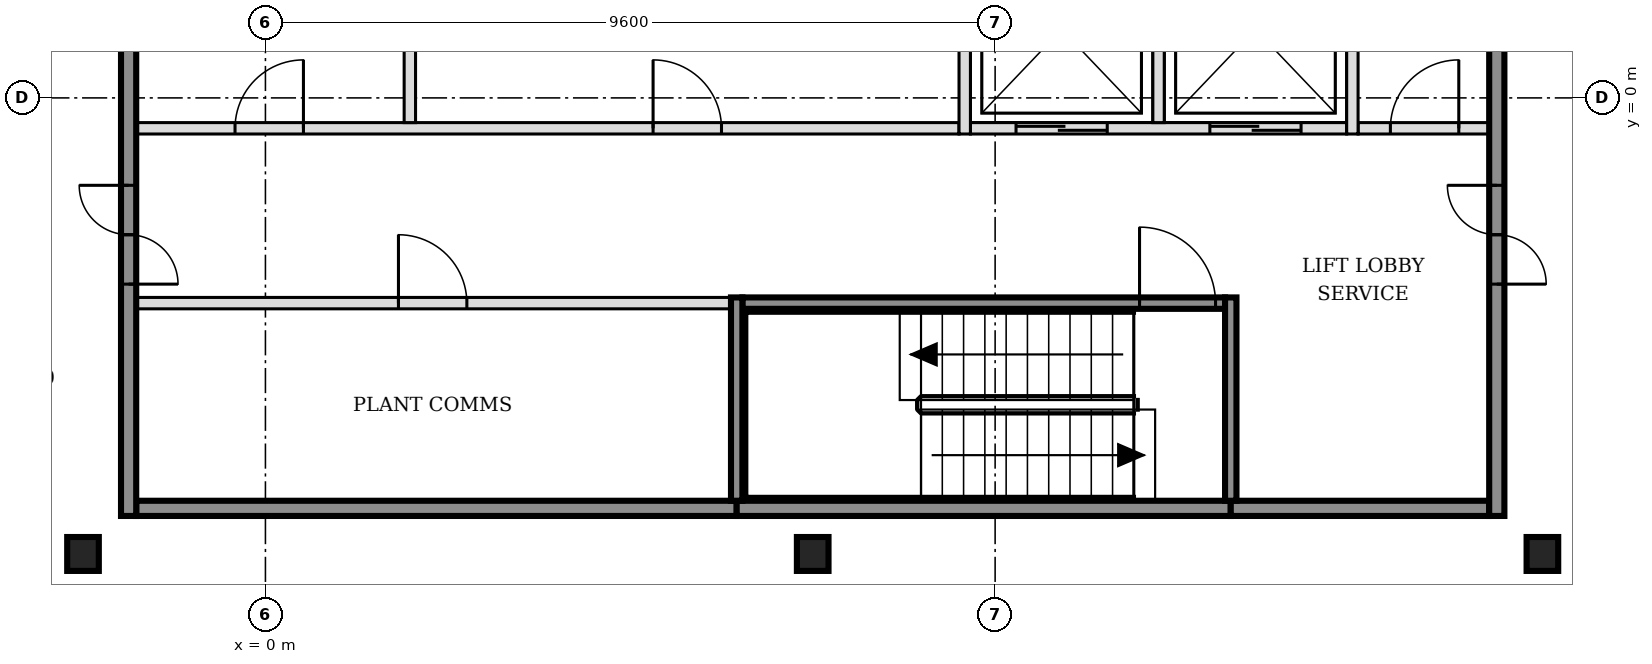
"""IFC4 building model, lengths in metres.
Left out: names, types, materials, properties, quantities, classifications, styles, units other than length and angle.
Written with IfcOpenShell. Run it as: python <this file> out.ifc"""

import sys

from ifc_helpers import new_model, si_unit, direction, frame, frame_2d, origin, origin_2d, place, context, subcontext, project, spatial, rectangle, i_section, extrude, element, fill, save


model = new_model("IFC4")
c1 = context("Model", 3, precision=1e-05, world=origin(), true_north=direction((0.0, 1.0)))
c2 = subcontext(c1, "Body", "Model", "MODEL_VIEW")
j1 = project(units=[si_unit("LENGTHUNIT", "METRE"), si_unit("PLANEANGLEUNIT", "RADIAN")], contexts=[c1])
p1 = place(None, origin())
s1 = spatial("IfcSite", under=j1, at=p1, CompositionType="ELEMENT")
p2 = place(p1, origin())
s2 = spatial("IfcBuilding", under=s1, at=p2, CompositionType="ELEMENT")
p3 = place(p2, frame((0.0, 0.0, 183.0)))
s3 = spatial("IfcBuildingStorey", under=s2, at=p3, CompositionType="ELEMENT", Elevation=183.0)
for number, where, z_axis, x_axis in (
    (1, (-2.4, -6.0, -0.15), (0.0, 0.0, 1.0), (1.0, 0.0, 0.0)),
    (2, (7.2, -6.0, -0.15), (0.0, 0.0, 1.0), (1.0, 0.0, 0.0)),
    (3, (16.8, -6.0, -0.15), (0.0, 0.0, 1.0), (1.0, 0.0, 0.0)),
):
    element("IfcColumn", number, at=place(p3, frame(where, z_axis=z_axis, x_axis=x_axis)), inside=s3, PredefinedType="COLUMN", context=c2, shape_type="SweptSolid", body=[
        extrude(i_section(OverallWidth=0.416, OverallDepth=0.446, WebThickness=0.039, FlangeThickness=0.063, FilletRadius=0.015, at=origin_2d()), origin(), (0.0, 0.0, 1.0), 3.6),
    ])
p4 = place(p3, frame((-1.7, -5.4, 0.0), z_axis=(0.0, 0.0, 1.0), x_axis=(1.0, 0.0, 0.0)))
e4 = element("IfcWall", 4, at=p4, inside=s3, PredefinedType="SOLIDWALL", context=c2, shape_type="SweptSolid", body=[
    extrude(rectangle(XDim=7.9, YDim=0.2, at=frame_2d((3.95, 0.0))), origin(), (0.0, 0.0, 1.0), 3.45),
])
p5 = place(p3, frame((6.2, -5.4, 0.0), z_axis=(0.0, 0.0, 1.0), x_axis=(1.0, 0.0, 0.0)))
e5 = element("IfcWall", 5, at=p5, inside=s3, PredefinedType="SOLIDWALL", context=c2, shape_type="SweptSolid", body=[
    extrude(rectangle(XDim=6.5, YDim=0.2, at=frame_2d((3.25, 0.0))), origin(), (0.0, 0.0, 1.0), 3.45),
])
p6 = place(p3, frame((12.7, -5.4, 0.0), z_axis=(0.0, 0.0, 1.0), x_axis=(1.0, 0.0, 0.0)))
e6 = element("IfcWall", 6, at=p6, inside=s3, PredefinedType="SOLIDWALL", context=c2, shape_type="SweptSolid", body=[
    extrude(rectangle(XDim=3.4, YDim=0.2, at=frame_2d((1.7, 0.0))), origin(), (0.0, 0.0, 1.0), 3.45),
])
p7 = place(p3, frame((-1.7, -2.7, 0.0), z_axis=(0.0, 0.0, 1.0), x_axis=(1.0, 0.0, 0.0)))
e7 = element("IfcWall", 7, at=p7, inside=s3, PredefinedType="PARTITIONING", context=c2, shape_type="SweptSolid", body=[
    extrude(rectangle(XDim=7.825, YDim=0.15, at=frame_2d((3.913, 0.0))), origin(), (0.0, 0.0, 1.0), 3.45),
])
p8 = place(p7, frame((3.45, 0.0, 0.0)))
e8 = element("IfcOpeningElement", 8, at=p8, cuts=e7, PredefinedType="OPENING", context=c2, shape_type="SweptSolid", body=[
    extrude(rectangle(XDim=0.9, YDim=2.1, at=frame_2d((0.45, 1.05))), frame((0.0, 0.085, 0.0), z_axis=(0.0, -1.0, 0.0), x_axis=(1.0, 0.0, 0.0)), (0.0, 0.0, 1.0), 0.17),
])
p9 = place(p3, frame((6.275, -2.7, 0.0), z_axis=(0.0, 0.0, 1.0), x_axis=(1.0, 0.0, 0.0)))
e9 = element("IfcWall", 9, at=p9, inside=s3, PredefinedType="SOLIDWALL", context=c2, shape_type="SweptSolid", body=[
    extrude(rectangle(XDim=6.35, YDim=0.15, at=frame_2d((3.175, 0.0))), origin(), (0.0, 0.0, 1.0), 3.45),
])
p10 = place(p9, frame((5.225, 0.0, 0.0)))
e10 = element("IfcOpeningElement", 10, at=p10, cuts=e9, PredefinedType="OPENING", context=c2, shape_type="SweptSolid", body=[
    extrude(rectangle(XDim=1.0, YDim=2.1, at=frame_2d((0.5, 1.05))), frame((0.0, 0.085, 0.0), z_axis=(0.0, -1.0, 0.0), x_axis=(1.0, 0.0, 0.0)), (0.0, 0.0, 1.0), 0.17),
])
p11 = place(p3, frame((-1.7, -0.4, 0.0), z_axis=(0.0, 0.0, 1.0), x_axis=(1.0, 0.0, 0.0)))
e11 = element("IfcWall", 11, at=p11, inside=s3, PredefinedType="PARTITIONING", context=c2, shape_type="SweptSolid", body=[
    extrude(rectangle(XDim=10.825, YDim=0.15, at=frame_2d((5.413, 0.0))), origin(), (0.0, 0.0, 1.0), 3.45),
])
p12 = place(p11, frame((1.3, 0.0, 0.0)))
e12 = element("IfcOpeningElement", 12, at=p12, cuts=e11, PredefinedType="OPENING", context=c2, shape_type="SweptSolid", body=[
    extrude(rectangle(XDim=0.9, YDim=2.1, at=frame_2d((0.45, 1.05))), frame((0.0, 0.085, 0.0), z_axis=(0.0, -1.0, 0.0), x_axis=(1.0, 0.0, 0.0)), (0.0, 0.0, 1.0), 0.17),
])
p13 = place(p11, frame((6.8, 0.0, 0.0)))
e13 = element("IfcOpeningElement", 13, at=p13, cuts=e11, PredefinedType="OPENING", context=c2, shape_type="SweptSolid", body=[
    extrude(rectangle(XDim=0.9, YDim=2.1, at=frame_2d((0.45, 1.05))), frame((0.0, 0.085, 0.0), z_axis=(0.0, -1.0, 0.0), x_axis=(1.0, 0.0, 0.0)), (0.0, 0.0, 1.0), 0.17),
])
p14 = place(p3, frame((9.275, -0.4, 0.0), z_axis=(0.0, 0.0, 1.0), x_axis=(1.0, 0.0, 0.0)))
e14 = element("IfcWall", 14, at=p14, inside=s3, PredefinedType="SOLIDWALL", context=c2, shape_type="SweptSolid", body=[
    extrude(rectangle(XDim=4.95, YDim=0.15, at=frame_2d((2.475, 0.0))), origin(), (0.0, 0.0, 1.0), 3.45),
])
p15 = place(p14, frame((0.6, 0.0, 0.0)))
e15 = element("IfcOpeningElement", 15, at=p15, cuts=e14, PredefinedType="OPENING", context=c2, shape_type="SweptSolid", body=[
    extrude(rectangle(XDim=1.2, YDim=2.1, at=frame_2d((0.6, 1.05))), frame((0.0, 0.085, 0.0), z_axis=(0.0, -1.0, 0.0), x_axis=(1.0, 0.0, 0.0)), (0.0, 0.0, 1.0), 0.17),
])
p16 = place(p14, frame((3.15, 0.0, 0.0)))
e16 = element("IfcOpeningElement", 16, at=p16, cuts=e14, PredefinedType="OPENING", context=c2, shape_type="SweptSolid", body=[
    extrude(rectangle(XDim=1.2, YDim=2.1, at=frame_2d((0.6, 1.05))), frame((0.0, 0.085, 0.0), z_axis=(0.0, -1.0, 0.0), x_axis=(1.0, 0.0, 0.0)), (0.0, 0.0, 1.0), 0.17),
])
p17 = place(p3, frame((14.375, -0.4, 0.0), z_axis=(0.0, 0.0, 1.0), x_axis=(1.0, 0.0, 0.0)))
e17 = element("IfcWall", 17, at=p17, inside=s3, PredefinedType="PARTITIONING", context=c2, shape_type="SweptSolid", body=[
    extrude(rectangle(XDim=1.725, YDim=0.15, at=frame_2d((0.863, 0.0))), origin(), (0.0, 0.0, 1.0), 3.45),
])
p18 = place(p17, frame((0.425, 0.0, 0.0)))
e18 = element("IfcOpeningElement", 18, at=p18, cuts=e17, PredefinedType="OPENING", context=c2, shape_type="SweptSolid", body=[
    extrude(rectangle(XDim=0.9, YDim=2.1, at=frame_2d((0.45, 1.05))), frame((0.0, 0.085, 0.0), z_axis=(0.0, -1.0, 0.0), x_axis=(1.0, 0.0, 0.0)), (0.0, 0.0, 1.0), 0.17),
])
p19 = place(p3, frame((-1.8, -5.5, 0.0), z_axis=(0.0, 0.0, 1.0), x_axis=(0.0, 1.0, 0.0)))
e19 = element("IfcWall", 19, at=p19, inside=s3, PredefinedType="SOLIDWALL", context=c2, shape_type="SweptSolid", body=[
    extrude(rectangle(XDim=15.8, YDim=0.2, at=frame_2d((7.9, 0.0))), origin(), (0.0, 0.0, 1.0), 3.45),
])
p20 = place(p19, frame((3.05, 0.0, 0.0)))
e20 = element("IfcOpeningElement", 20, at=p20, cuts=e19, PredefinedType="OPENING", context=c2, shape_type="SweptSolid", body=[
    extrude(rectangle(XDim=1.3, YDim=2.1, at=frame_2d((0.65, 1.05))), frame((0.0, 0.11, 0.0), z_axis=(0.0, -1.0, 0.0), x_axis=(1.0, 0.0, 0.0)), (0.0, 0.0, 1.0), 0.22),
])
p21 = place(p19, frame((11.45, 0.0, 0.0)))
e21 = element("IfcOpeningElement", 21, at=p21, cuts=e19, PredefinedType="OPENING", context=c2, shape_type="SweptSolid", body=[
    extrude(rectangle(XDim=1.3, YDim=2.1, at=frame_2d((0.65, 1.05))), frame((0.0, 0.11, 0.0), z_axis=(0.0, -1.0, 0.0), x_axis=(1.0, 0.0, 0.0)), (0.0, 0.0, 1.0), 0.22),
])
p22 = place(p3, frame((1.9, -0.325, 0.0), z_axis=(0.0, 0.0, 1.0), x_axis=(0.0, 1.0, 0.0)))
e22 = element("IfcWall", 22, at=p22, inside=s3, PredefinedType="PARTITIONING", context=c2, shape_type="SweptSolid", body=[
    extrude(rectangle(XDim=2.45, YDim=0.15, at=frame_2d((1.225, 0.0))), origin(), (0.0, 0.0, 1.0), 3.45),
])
p23 = place(p3, frame((6.2, -5.3, 0.0), z_axis=(0.0, 0.0, 1.0), x_axis=(0.0, 1.0, 0.0)))
e23 = element("IfcWall", 23, at=p23, inside=s3, PredefinedType="SOLIDWALL", context=c2, shape_type="SweptSolid", body=[
    extrude(rectangle(XDim=2.675, YDim=0.15, at=frame_2d((1.337, 0.0))), origin(), (0.0, 0.0, 1.0), 3.45),
])
p24 = place(p3, frame((9.2, -0.475, 0.0), z_axis=(0.0, 0.0, 1.0), x_axis=(0.0, 1.0, 0.0)))
e24 = element("IfcWall", 24, at=p24, inside=s3, PredefinedType="SOLIDWALL", context=c2, shape_type="SweptSolid", body=[
    extrude(rectangle(XDim=2.6, YDim=0.15, at=frame_2d((1.3, 0.0))), origin(), (0.0, 0.0, 1.0), 3.45),
])
p25 = place(p3, frame((11.75, -0.325, 0.0), z_axis=(0.0, 0.0, 1.0), x_axis=(0.0, 1.0, 0.0)))
e25 = element("IfcWall", 25, at=p25, inside=s3, PredefinedType="SOLIDWALL", context=c2, shape_type="SweptSolid", body=[
    extrude(rectangle(XDim=2.45, YDim=0.15, at=frame_2d((1.225, 0.0))), origin(), (0.0, 0.0, 1.0), 3.45),
])
p26 = place(p3, frame((12.7, -5.3, 0.0), z_axis=(0.0, 0.0, 1.0), x_axis=(0.0, 1.0, 0.0)))
e26 = element("IfcWall", 26, at=p26, inside=s3, PredefinedType="SOLIDWALL", context=c2, shape_type="SweptSolid", body=[
    extrude(rectangle(XDim=2.675, YDim=0.15, at=frame_2d((1.337, 0.0))), origin(), (0.0, 0.0, 1.0), 3.45),
])
p27 = place(p3, frame((14.3, -0.475, 0.0), z_axis=(0.0, 0.0, 1.0), x_axis=(0.0, 1.0, 0.0)))
e27 = element("IfcWall", 27, at=p27, inside=s3, PredefinedType="SOLIDWALL", context=c2, shape_type="SweptSolid", body=[
    extrude(rectangle(XDim=2.75, YDim=0.15, at=frame_2d((1.375, 0.0))), origin(), (0.0, 0.0, 1.0), 3.45),
])
p28 = place(p3, frame((16.2, -5.5, 0.0), z_axis=(0.0, 0.0, 1.0), x_axis=(0.0, 1.0, 0.0)))
e28 = element("IfcWall", 28, at=p28, inside=s3, PredefinedType="SOLIDWALL", context=c2, shape_type="SweptSolid", body=[
    extrude(rectangle(XDim=15.8, YDim=0.2, at=frame_2d((7.9, 0.0))), origin(), (0.0, 0.0, 1.0), 3.45),
])
p29 = place(p28, frame((3.05, 0.0, 0.0)))
e29 = element("IfcOpeningElement", 29, at=p29, cuts=e28, PredefinedType="OPENING", context=c2, shape_type="SweptSolid", body=[
    extrude(rectangle(XDim=1.3, YDim=2.1, at=frame_2d((0.65, 1.05))), frame((0.0, 0.11, 0.0), z_axis=(0.0, -1.0, 0.0), x_axis=(1.0, 0.0, 0.0)), (0.0, 0.0, 1.0), 0.22),
])
p30 = place(p28, frame((11.45, 0.0, 0.0)))
e30 = element("IfcOpeningElement", 30, at=p30, cuts=e28, PredefinedType="OPENING", context=c2, shape_type="SweptSolid", body=[
    extrude(rectangle(XDim=1.3, YDim=2.1, at=frame_2d((0.65, 1.05))), frame((0.0, 0.11, 0.0), z_axis=(0.0, -1.0, 0.0), x_axis=(1.0, 0.0, 0.0)), (0.0, 0.0, 1.0), 0.22),
])
p31 = place(p3, frame((-0.972, -15.622, 0.0), z_axis=(0.0, 0.0, 1.0), x_axis=(-0.707106781187, 0.707106781187, 0.0)))
e31 = element("IfcWall", 31, at=p31, inside=s3, PredefinedType="PARTITIONING", context=c2, shape_type="SweptSolid", body=[
    extrude(rectangle(XDim=18.809, YDim=0.15, at=frame_2d((9.405, 0.0))), origin(), (0.0, 0.0, 1.0), 2.83),
])
p32 = place(p31, frame((8.292, 0.0, 0.0)))
e32 = element("IfcOpeningElement", 32, at=p32, cuts=e31, PredefinedType="OPENING", context=c2, shape_type="SweptSolid", body=[
    extrude(rectangle(XDim=0.9, YDim=2.1, at=frame_2d((0.45, 1.05))), frame((0.0, 0.085, 0.0), z_axis=(0.0, -1.0, 0.0), x_axis=(1.0, 0.0, 0.0)), (0.0, 0.0, 1.0), 0.17),
])
p33 = place(p31, frame((2.195, 0.0, 0.0)))
e33 = element("IfcOpeningElement", 33, at=p33, cuts=e31, PredefinedType="OPENING", context=c2, shape_type="SweptSolid", body=[
    extrude(rectangle(XDim=0.9, YDim=2.1, at=frame_2d((0.45, 1.05))), frame((0.0, 0.085, 0.0), z_axis=(0.0, -1.0, 0.0), x_axis=(1.0, 0.0, 0.0)), (0.0, 0.0, 1.0), 0.17),
])
p34 = place(p15, origin())
e34 = element("IfcDoor", 34, at=p34, inside=s3, OperationType="DOUBLE_DOOR_SLIDING", PredefinedType="DOOR", context=c2, shape_type="SweptSolid", body=[
    extrude(rectangle(XDim=1.2, YDim=2.1, at=frame_2d((0.6, 1.05))), frame((0.0, 0.025, 0.0), z_axis=(0.0, -1.0, 0.0), x_axis=(1.0, 0.0, 0.0)), (0.0, 0.0, 1.0), 0.05),
])
fill(e15, e34)
p35 = place(p16, origin())
e35 = element("IfcDoor", 35, at=p35, inside=s3, OperationType="DOUBLE_DOOR_SLIDING", PredefinedType="DOOR", context=c2, shape_type="SweptSolid", body=[
    extrude(rectangle(XDim=1.2, YDim=2.1, at=frame_2d((0.6, 1.05))), frame((0.0, 0.025, 0.0), z_axis=(0.0, -1.0, 0.0), x_axis=(1.0, 0.0, 0.0)), (0.0, 0.0, 1.0), 0.05),
])
fill(e16, e35)
p36 = place(p10, origin())
e36 = element("IfcDoor", 36, at=p36, inside=s3, OperationType="SINGLE_SWING_LEFT", PredefinedType="DOOR", context=c2, shape_type="SweptSolid", body=[
    extrude(rectangle(XDim=1.0, YDim=2.1, at=frame_2d((0.5, 1.05))), frame((0.0, 0.025, 0.0), z_axis=(0.0, -1.0, 0.0), x_axis=(1.0, 0.0, 0.0)), (0.0, 0.0, 1.0), 0.05),
])
fill(e10, e36)
p37 = place(p20, origin())
e37 = element("IfcDoor", 37, at=p37, inside=s3, OperationType="DOUBLE_DOOR_SINGLE_SWING", PredefinedType="DOOR", context=c2, shape_type="SweptSolid", body=[
    extrude(rectangle(XDim=1.3, YDim=2.1, at=frame_2d((0.65, 1.05))), frame((0.0, 0.025, 0.0), z_axis=(0.0, -1.0, 0.0), x_axis=(1.0, 0.0, 0.0)), (0.0, 0.0, 1.0), 0.05),
])
fill(e20, e37)
p38 = place(p29, origin())
e38 = element("IfcDoor", 38, at=p38, inside=s3, OperationType="DOUBLE_DOOR_SINGLE_SWING", PredefinedType="DOOR", context=c2, shape_type="SweptSolid", body=[
    extrude(rectangle(XDim=1.3, YDim=2.1, at=frame_2d((0.65, 1.05))), frame((0.0, 0.025, 0.0), z_axis=(0.0, -1.0, 0.0), x_axis=(1.0, 0.0, 0.0)), (0.0, 0.0, 1.0), 0.05),
])
fill(e29, e38)
p39 = place(p18, origin())
e39 = element("IfcDoor", 39, at=p39, inside=s3, OperationType="SINGLE_SWING_RIGHT", PredefinedType="DOOR", context=c2, shape_type="SweptSolid", body=[
    extrude(rectangle(XDim=0.9, YDim=2.1, at=frame_2d((0.45, 1.05))), frame((0.0, 0.025, 0.0), z_axis=(0.0, -1.0, 0.0), x_axis=(1.0, 0.0, 0.0)), (0.0, 0.0, 1.0), 0.05),
])
fill(e18, e39)
p40 = place(p8, origin())
e40 = element("IfcDoor", 40, at=p40, inside=s3, OperationType="SINGLE_SWING_LEFT", PredefinedType="DOOR", context=c2, shape_type="SweptSolid", body=[
    extrude(rectangle(XDim=0.9, YDim=2.1, at=frame_2d((0.45, 1.05))), frame((0.0, 0.025, 0.0), z_axis=(0.0, -1.0, 0.0), x_axis=(1.0, 0.0, 0.0)), (0.0, 0.0, 1.0), 0.05),
])
fill(e8, e40)
p41 = place(p12, origin())
e41 = element("IfcDoor", 41, at=p41, inside=s3, OperationType="SINGLE_SWING_RIGHT", PredefinedType="DOOR", context=c2, shape_type="SweptSolid", body=[
    extrude(rectangle(XDim=0.9, YDim=2.1, at=frame_2d((0.45, 1.05))), frame((0.0, 0.025, 0.0), z_axis=(0.0, -1.0, 0.0), x_axis=(1.0, 0.0, 0.0)), (0.0, 0.0, 1.0), 0.05),
])
fill(e12, e41)
p42 = place(p13, origin())
e42 = element("IfcDoor", 42, at=p42, inside=s3, OperationType="SINGLE_SWING_LEFT", PredefinedType="DOOR", context=c2, shape_type="SweptSolid", body=[
    extrude(rectangle(XDim=0.9, YDim=2.1, at=frame_2d((0.45, 1.05))), frame((0.0, 0.025, 0.0), z_axis=(0.0, -1.0, 0.0), x_axis=(1.0, 0.0, 0.0)), (0.0, 0.0, 1.0), 0.05),
])
fill(e13, e42)
save(model, sys.argv[1])
